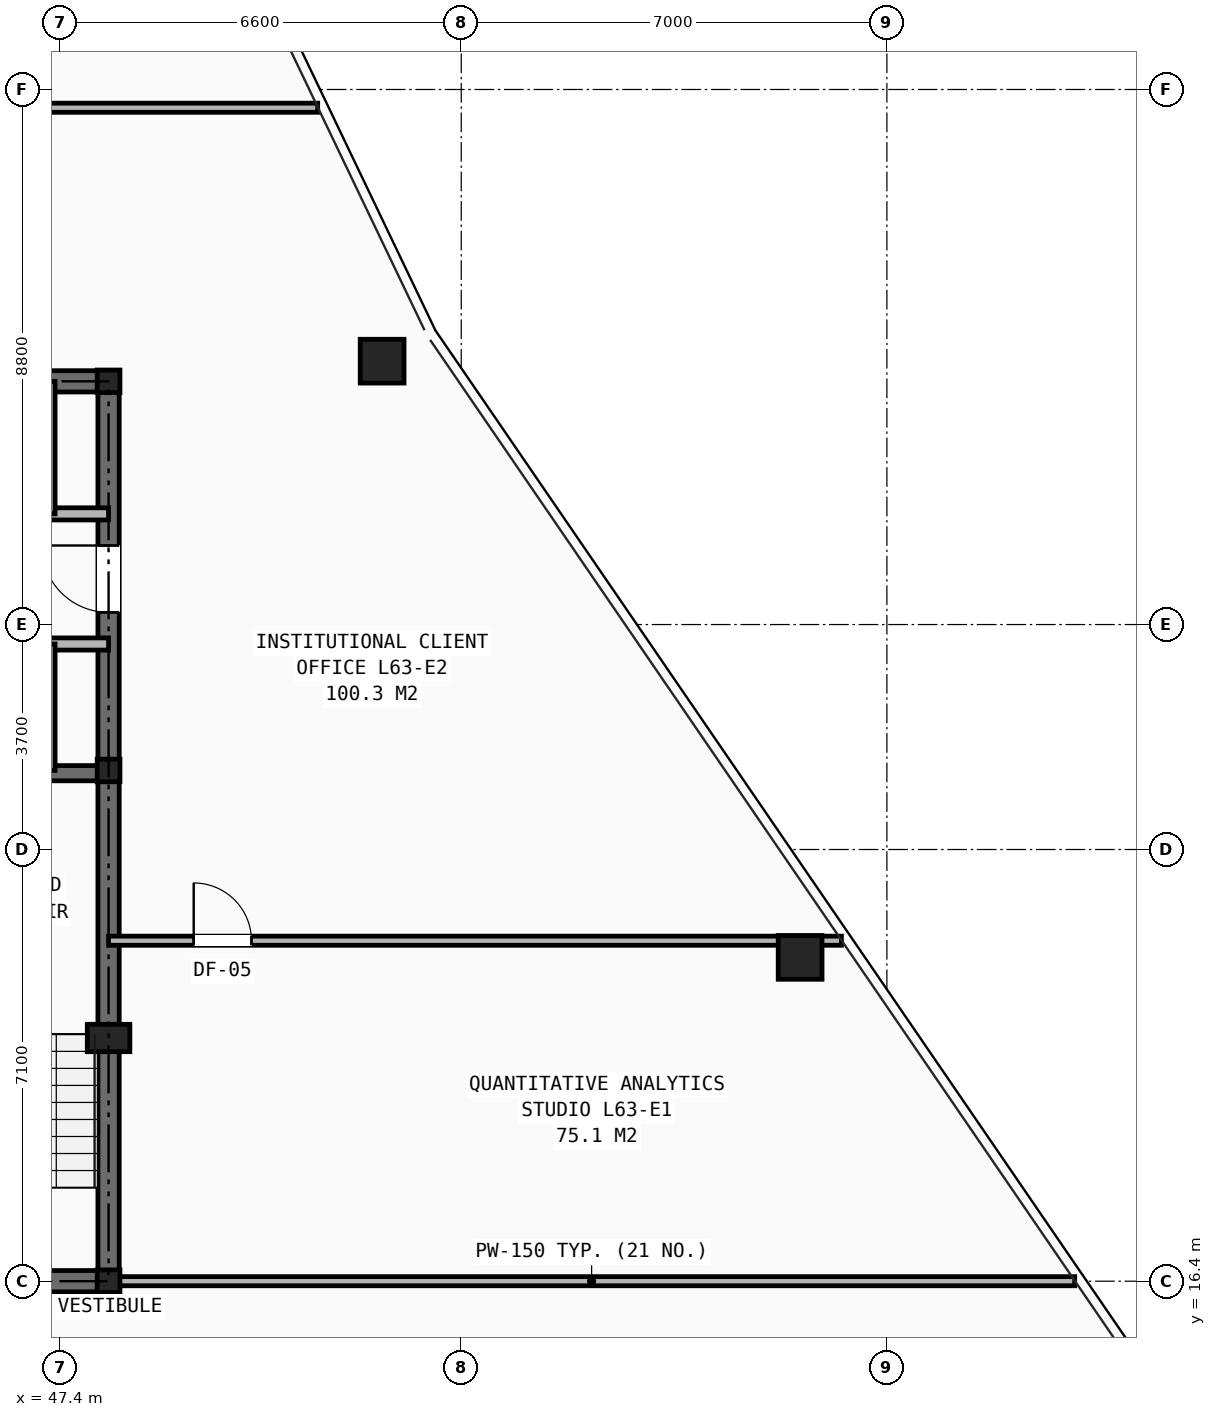
"""IFC4 building model, lengths in metres.
Left out: names, types, materials, properties, quantities, classifications, styles, units other than length and angle.
Written with IfcOpenShell. Run it as: python <this file> out.ifc"""

import sys

from ifc_helpers import new_model, si_unit, direction, frame, frame_2d, origin, origin_2d, place, context, subcontext, project, spatial, rectangle, hollow_rectangle, i_section, extrude, element, fill, save


model = new_model("IFC4")
c1 = context("Model", 3, precision=1e-05, world=origin(), true_north=direction((0.0, 1.0)))
c2 = subcontext(c1, "Body", "Model", "MODEL_VIEW")
j1 = project(units=[si_unit("LENGTHUNIT", "METRE"), si_unit("PLANEANGLEUNIT", "RADIAN")], contexts=[c1])
p1 = place(None, origin())
s1 = spatial("IfcSite", under=j1, at=p1, CompositionType="ELEMENT")
p2 = place(p1, origin())
s2 = spatial("IfcBuilding", under=s1, at=p2, CompositionType="ELEMENT")
p3 = place(p2, frame((0.0, 0.0, 222.4)))
s3 = spatial("IfcBuildingStorey", under=s2, at=p3, CompositionType="ELEMENT", Elevation=222.4)
for number, where, z_axis, x_axis in (
    (1, (48.2, 16.4, 0.0), (0.0, 0.0, 1.0), (1.0, 0.0, 0.0)),
    (2, (48.2, 24.8, 0.0), (0.0, 0.0, 1.0), (1.0, 0.0, 0.0)),
    (3, (48.2, 31.2, 0.0), (0.0, 0.0, 1.0), (1.0, 0.0, 0.0)),
):
    element("IfcColumn", number, at=place(p3, frame(where, z_axis=z_axis, x_axis=x_axis)), inside=s3, PredefinedType="COLUMN", context=c2, shape_type="SweptSolid", body=[
        extrude(i_section(OverallWidth=0.374, OverallDepth=0.372, WebThickness=0.016, FlangeThickness=0.026, at=origin_2d()), origin(), (0.0, 0.0, 1.0), 3.5),
    ])
p4 = place(p3, frame((48.2, 20.4, 0.0), z_axis=(0.0, 0.0, 1.0), x_axis=(1.0, 0.0, 0.0)))
e4 = element("IfcColumn", 4, at=p4, inside=s3, PredefinedType="PILASTER", context=c2, shape_type="SweptSolid", body=[
    extrude(rectangle(XDim=0.7, YDim=0.45, at=origin_2d()), origin(), (0.0, 0.0, 1.0), 3.5),
])
for number, where, z_axis, x_axis in (
    (5, (59.573, 21.726, 0.0), (0.0, 0.0, 1.0), (1.0, 0.0, 0.0)),
    (6, (52.699, 31.532, 0.0), (0.0, 0.0, 1.0), (1.0, 0.0, 0.0)),
):
    element("IfcColumn", number, at=place(p3, frame(where, z_axis=z_axis, x_axis=x_axis)), inside=s3, PredefinedType="COLUMN", context=c2, shape_type="SweptSolid", body=[
        extrude(hollow_rectangle(XDim=0.72, YDim=0.72, WallThickness=0.05, at=origin_2d()), origin(), (0.0, 0.0, 1.0), 3.5),
    ])
p5 = place(p3, frame((31.8, 16.4, 0.0), z_axis=(0.0, 0.0, 1.0), x_axis=(1.0, 0.0, 0.0)))
e7 = element("IfcWall", 7, at=p5, inside=s3, PredefinedType="SHEAR", context=c2, shape_type="SweptSolid", body=[
    extrude(rectangle(XDim=16.4, YDim=0.35, at=frame_2d((8.2, 0.0))), origin(), (0.0, 0.0, 1.0), 3.25),
])
p6 = place(p5, frame((7.75, 0.0, 0.0)))
e8 = element("IfcOpeningElement", 8, at=p6, cuts=e7, PredefinedType="OPENING", context=c2, shape_type="SweptSolid", body=[
    extrude(rectangle(XDim=0.9, YDim=2.1, at=frame_2d((0.45, 1.05))), frame((0.0, 0.185, 0.0), z_axis=(0.0, -1.0, 0.0), x_axis=(1.0, 0.0, 0.0)), (0.0, 0.0, 1.0), 0.37),
])
p7 = place(p5, frame((4.2, 0.0, 0.0)))
e9 = element("IfcOpeningElement", 9, at=p7, cuts=e7, PredefinedType="OPENING", context=c2, shape_type="SweptSolid", body=[
    extrude(rectangle(XDim=0.95, YDim=2.1, at=frame_2d((0.475, 1.05))), frame((0.0, 0.185, 0.0), z_axis=(0.0, -1.0, 0.0), x_axis=(1.0, 0.0, 0.0)), (0.0, 0.0, 1.0), 0.37),
])
p8 = place(p5, frame((10.6, 0.0, 0.0)))
e10 = element("IfcOpeningElement", 10, at=p8, cuts=e7, PredefinedType="OPENING", context=c2, shape_type="SweptSolid", body=[
    extrude(rectangle(XDim=0.95, YDim=2.1, at=frame_2d((0.475, 1.05))), frame((0.0, 0.185, 0.0), z_axis=(0.0, -1.0, 0.0), x_axis=(1.0, 0.0, 0.0)), (0.0, 0.0, 1.0), 0.37),
])
p9 = place(p3, frame((31.8, 31.2, 0.0), z_axis=(0.0, 0.0, 1.0), x_axis=(1.0, 0.0, 0.0)))
e11 = element("IfcWall", 11, at=p9, inside=s3, PredefinedType="SHEAR", context=c2, shape_type="SweptSolid", body=[
    extrude(rectangle(XDim=16.4, YDim=0.35, at=frame_2d((8.2, 0.0))), origin(), (0.0, 0.0, 1.0), 3.25),
])
p10 = place(p3, frame((48.2, 16.4, 0.0), z_axis=(0.0, 0.0, 1.0), x_axis=(0.0, 1.0, 0.0)))
e12 = element("IfcWall", 12, at=p10, inside=s3, PredefinedType="SHEAR", context=c2, shape_type="SweptSolid", body=[
    extrude(rectangle(XDim=14.8, YDim=0.35, at=frame_2d((7.4, 0.0))), origin(), (0.0, 0.0, 1.0), 3.25),
])
p11 = place(p10, frame((11.0, 0.0, 0.0)))
e13 = element("IfcOpeningElement", 13, at=p11, cuts=e12, PredefinedType="OPENING", context=c2, shape_type="SweptSolid", body=[
    extrude(rectangle(XDim=1.1, YDim=2.15, at=frame_2d((0.55, 1.075))), frame((0.0, 0.185, 0.0), z_axis=(0.0, -1.0, 0.0), x_axis=(1.0, 0.0, 0.0)), (0.0, 0.0, 1.0), 0.37),
])
p12 = place(p3, frame((44.955, 24.755, 0.0), z_axis=(0.0, 0.0, 1.0), x_axis=(1.0, 0.0, 0.0)))
e14 = element("IfcWall", 14, at=p12, inside=s3, PredefinedType="SHEAR", context=c2, shape_type="SweptSolid", body=[
    extrude(rectangle(XDim=3.245, YDim=0.25, at=frame_2d((1.623, 0.0))), origin(), (0.0, 0.0, 1.0), 3.25),
])
p13 = place(p3, frame((31.8, 29.02, 0.0), z_axis=(0.0, 0.0, 1.0), x_axis=(1.0, 0.0, 0.0)))
e15 = element("IfcWall", 15, at=p13, inside=s3, PredefinedType="SOLIDWALL", context=c2, shape_type="SweptSolid", body=[
    extrude(rectangle(XDim=16.4, YDim=0.2, at=frame_2d((8.2, 0.0))), origin(), (0.0, 0.0, 1.0), 2.705),
])
p14 = place(p13, frame((0.55, 0.0, 0.0)))
e16 = element("IfcOpeningElement", 16, at=p14, cuts=e15, PredefinedType="OPENING", context=c2, shape_type="SweptSolid", body=[
    extrude(rectangle(XDim=0.85, YDim=2.05, at=frame_2d((0.425, 1.025))), frame((0.0, 0.11, 0.0), z_axis=(0.0, -1.0, 0.0), x_axis=(1.0, 0.0, 0.0)), (0.0, 0.0, 1.0), 0.22),
])
p15 = place(p13, frame((5.94, 0.0, 0.0)))
e17 = element("IfcOpeningElement", 17, at=p15, cuts=e15, PredefinedType="OPENING", context=c2, shape_type="SweptSolid", body=[
    extrude(rectangle(XDim=0.9, YDim=2.1, at=frame_2d((0.45, 1.05))), frame((0.0, 0.11, 0.0), z_axis=(0.0, -1.0, 0.0), x_axis=(1.0, 0.0, 0.0)), (0.0, 0.0, 1.0), 0.22),
])
p16 = place(p13, frame((11.41, 0.0, 0.0)))
e18 = element("IfcOpeningElement", 18, at=p16, cuts=e15, PredefinedType="OPENING", context=c2, shape_type="SweptSolid", body=[
    extrude(rectangle(XDim=1.1, YDim=2.15, at=frame_2d((0.55, 1.075))), frame((0.0, 0.11, 0.0), z_axis=(0.0, -1.0, 0.0), x_axis=(1.0, 0.0, 0.0)), (0.0, 0.0, 1.0), 0.22),
])
p17 = place(p13, frame((13.73, 0.0, 0.0)))
e19 = element("IfcOpeningElement", 19, at=p17, cuts=e15, PredefinedType="OPENING", context=c2, shape_type="SweptSolid", body=[
    extrude(rectangle(XDim=1.1, YDim=2.15, at=frame_2d((0.55, 1.075))), frame((0.0, 0.11, 0.0), z_axis=(0.0, -1.0, 0.0), x_axis=(1.0, 0.0, 0.0)), (0.0, 0.0, 1.0), 0.22),
])
p18 = place(p3, frame((31.8, 26.88, 0.0), z_axis=(0.0, 0.0, 1.0), x_axis=(1.0, 0.0, 0.0)))
e20 = element("IfcWall", 20, at=p18, inside=s3, PredefinedType="SOLIDWALL", context=c2, shape_type="SweptSolid", body=[
    extrude(rectangle(XDim=16.4, YDim=0.2, at=frame_2d((8.2, 0.0))), origin(), (0.0, 0.0, 1.0), 2.705),
])
p19 = place(p18, frame((0.55, 0.0, 0.0)))
e21 = element("IfcOpeningElement", 21, at=p19, cuts=e20, PredefinedType="OPENING", context=c2, shape_type="SweptSolid", body=[
    extrude(rectangle(XDim=0.85, YDim=2.05, at=frame_2d((0.425, 1.025))), frame((0.0, 0.11, 0.0), z_axis=(0.0, -1.0, 0.0), x_axis=(1.0, 0.0, 0.0)), (0.0, 0.0, 1.0), 0.22),
])
p20 = place(p18, frame((5.94, 0.0, 0.0)))
e22 = element("IfcOpeningElement", 22, at=p20, cuts=e20, PredefinedType="OPENING", context=c2, shape_type="SweptSolid", body=[
    extrude(rectangle(XDim=0.9, YDim=2.1, at=frame_2d((0.45, 1.05))), frame((0.0, 0.11, 0.0), z_axis=(0.0, -1.0, 0.0), x_axis=(1.0, 0.0, 0.0)), (0.0, 0.0, 1.0), 0.22),
])
p21 = place(p18, frame((11.41, 0.0, 0.0)))
e23 = element("IfcOpeningElement", 23, at=p21, cuts=e20, PredefinedType="OPENING", context=c2, shape_type="SweptSolid", body=[
    extrude(rectangle(XDim=1.1, YDim=2.15, at=frame_2d((0.55, 1.075))), frame((0.0, 0.11, 0.0), z_axis=(0.0, -1.0, 0.0), x_axis=(1.0, 0.0, 0.0)), (0.0, 0.0, 1.0), 0.22),
])
p22 = place(p18, frame((13.73, 0.0, 0.0)))
e24 = element("IfcOpeningElement", 24, at=p22, cuts=e20, PredefinedType="OPENING", context=c2, shape_type="SweptSolid", body=[
    extrude(rectangle(XDim=1.1, YDim=2.15, at=frame_2d((0.55, 1.075))), frame((0.0, 0.11, 0.0), z_axis=(0.0, -1.0, 0.0), x_axis=(1.0, 0.0, 0.0)), (0.0, 0.0, 1.0), 0.22),
])
p23 = place(p3, frame((47.24, 29.02, 0.0), z_axis=(0.0, 0.0, 1.0), x_axis=(0.0, 1.0, 0.0)))
e25 = element("IfcWall", 25, at=p23, inside=s3, PredefinedType="SOLIDWALL", context=c2, shape_type="SweptSolid", body=[
    extrude(rectangle(XDim=2.18, YDim=0.16, at=frame_2d((1.09, 0.0))), origin(), (0.0, 0.0, 1.0), 2.705),
])
p24 = place(p3, frame((47.24, 24.8, 0.0), z_axis=(0.0, 0.0, 1.0), x_axis=(0.0, 1.0, 0.0)))
e26 = element("IfcWall", 26, at=p24, inside=s3, PredefinedType="SOLIDWALL", context=c2, shape_type="SweptSolid", body=[
    extrude(rectangle(XDim=2.08, YDim=0.16, at=frame_2d((1.04, 0.0))), origin(), (0.0, 0.0, 1.0), 3.25),
])
p25 = place(p3, frame((48.2, 16.4, 0.0), z_axis=(0.0, 0.0, 1.0), x_axis=(1.0, 0.0, 0.0)))
e27 = element("IfcWall", 27, at=p25, inside=s3, PredefinedType="PARTITIONING", context=c2, shape_type="SweptSolid", body=[
    extrude(rectangle(XDim=15.888, YDim=0.15, at=frame_2d((7.944, 0.0))), origin(), (0.0, 0.0, 1.0), 2.265),
])
p26 = place(p3, frame((46.8, 35.7, 0.0), z_axis=(0.0, 0.0, 1.0), x_axis=(1.0, 0.0, 0.0)))
e28 = element("IfcWall", 28, at=p26, inside=s3, PredefinedType="PARTITIONING", context=c2, shape_type="SweptSolid", body=[
    extrude(rectangle(XDim=4.839, YDim=0.15, at=frame_2d((2.419, 0.0))), origin(), (0.0, 0.0, 1.0), 2.628),
])
p27 = place(p3, frame((48.2, 22.0, 0.0), z_axis=(0.0, 0.0, 1.0), x_axis=(1.0, 0.0, 0.0)))
e29 = element("IfcWall", 29, at=p27, inside=s3, PredefinedType="PARTITIONING", context=c2, shape_type="SweptSolid", body=[
    extrude(rectangle(XDim=12.052, YDim=0.15, at=frame_2d((6.026, 0.0))), origin(), (0.0, 0.0, 1.0), 2.265),
])
p28 = place(p27, frame((1.4, 0.0, 0.0)))
e30 = element("IfcOpeningElement", 30, at=p28, cuts=e29, PredefinedType="OPENING", context=c2, shape_type="SweptSolid", body=[
    extrude(rectangle(XDim=0.95, YDim=2.1, at=frame_2d((0.475, 1.05))), frame((0.0, 0.085, 0.0), z_axis=(0.0, -1.0, 0.0), x_axis=(1.0, 0.0, 0.0)), (0.0, 0.0, 1.0), 0.17),
])
p29 = place(p11, origin())
e31 = element("IfcDoor", 31, at=p29, inside=s3, OperationType="SINGLE_SWING_RIGHT", PredefinedType="DOOR", context=c2, shape_type="SweptSolid", body=[
    extrude(rectangle(XDim=1.1, YDim=2.15, at=frame_2d((0.55, 1.075))), frame((0.0, 0.025, 0.0), z_axis=(0.0, -1.0, 0.0), x_axis=(1.0, 0.0, 0.0)), (0.0, 0.0, 1.0), 0.05),
])
fill(e13, e31)
p30 = place(p28, origin())
e32 = element("IfcDoor", 32, at=p30, inside=s3, OperationType="SINGLE_SWING_LEFT", PredefinedType="DOOR", context=c2, shape_type="SweptSolid", body=[
    extrude(rectangle(XDim=0.95, YDim=2.1, at=frame_2d((0.475, 1.05))), frame((0.0, 0.025, 0.0), z_axis=(0.0, -1.0, 0.0), x_axis=(1.0, 0.0, 0.0)), (0.0, 0.0, 1.0), 0.05),
])
fill(e30, e32)
save(model, sys.argv[1])
